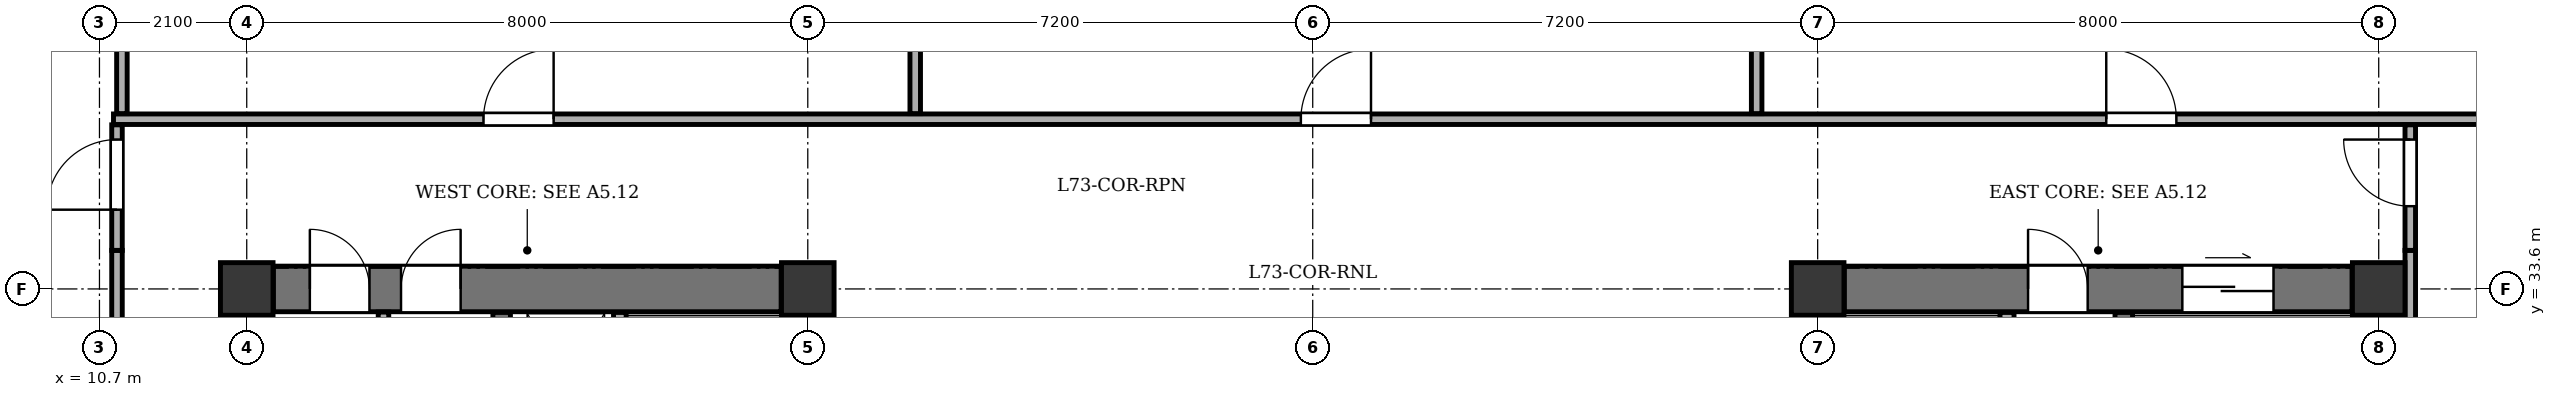
"""IFC4 building model, lengths in metres.
Left out: names, types, materials, properties, quantities, classifications, styles, units other than length and angle.
Written with IfcOpenShell. Run it as: python <this file> out.ifc"""

import sys

from ifc_helpers import new_model, si_unit, direction, frame, frame_2d, origin, origin_2d, place, context, subcontext, project, spatial, rectangle, extrude, element, fill, save


model = new_model("IFC4")
c1 = context("Model", 3, precision=1e-05, world=origin(), true_north=direction((0.0, 1.0)))
c2 = subcontext(c1, "Body", "Model", "MODEL_VIEW")
j1 = project(units=[si_unit("LENGTHUNIT", "METRE"), si_unit("PLANEANGLEUNIT", "RADIAN")], contexts=[c1])
p1 = place(None, origin())
s1 = spatial("IfcSite", under=j1, at=p1, CompositionType="ELEMENT")
p2 = place(p1, origin())
s2 = spatial("IfcBuilding", under=s1, at=p2, CompositionType="ELEMENT")
p3 = place(p2, frame((0.0, 0.0, 275.5)))
s3 = spatial("IfcBuildingStorey", under=s2, at=p3, CompositionType="ELEMENT", Elevation=275.5)
for number, where, z_axis, x_axis in (
    (1, (12.8, 33.6, 0.0), (0.0, 0.0, 1.0), (1.0, 0.0, 0.0)),
    (2, (20.8, 33.6, 0.0), (0.0, 0.0, 1.0), (1.0, 0.0, 0.0)),
    (3, (35.2, 33.6, 0.0), (0.0, 0.0, 1.0), (1.0, 0.0, 0.0)),
    (4, (43.2, 33.6, 0.0), (0.0, 0.0, 1.0), (1.0, 0.0, 0.0)),
):
    element("IfcColumn", number, at=place(p3, frame(where, z_axis=z_axis, x_axis=x_axis)), inside=s3, PredefinedType="COLUMN", context=c2, shape_type="SweptSolid", body=[
        extrude(rectangle(XDim=0.75, YDim=0.75, at=origin_2d()), origin(), (0.0, 0.0, 1.0), 3.4),
    ])
p4 = place(p3, frame((12.8, 21.18, 0.0), z_axis=(0.0, 0.0, 1.0), x_axis=(0.0, 1.0, 0.0)))
e5 = element("IfcWall", 5, at=p4, inside=s3, PredefinedType="SHEAR", context=c2, shape_type="SweptSolid", body=[
    extrude(rectangle(XDim=12.04, YDim=0.65, at=frame_2d((6.02, 0.0))), origin(), (0.0, 0.0, 1.0), 3.1),
])
p5 = place(p3, frame((13.18, 33.6, 0.0), z_axis=(0.0, 0.0, 1.0), x_axis=(1.0, 0.0, 0.0)))
e6 = element("IfcWall", 6, at=p5, inside=s3, PredefinedType="SHEAR", context=c2, shape_type="SweptSolid", body=[
    extrude(rectangle(XDim=7.24, YDim=0.65, at=frame_2d((3.62, 0.0))), origin(), (0.0, 0.0, 1.0), 3.1),
])
p6 = place(p5, frame((0.52, 0.0, 0.0)))
e7 = element("IfcOpeningElement", 7, at=p6, cuts=e6, PredefinedType="OPENING", context=c2, shape_type="SweptSolid", body=[
    extrude(rectangle(XDim=0.85, YDim=2.02, at=frame_2d((0.425, 1.01))), frame((0.0, 0.335, 0.0), z_axis=(0.0, -1.0, 0.0), x_axis=(1.0, 0.0, 0.0)), (0.0, 0.0, 1.0), 0.67),
])
p7 = place(p5, frame((1.82, 0.0, 0.0)))
e8 = element("IfcOpeningElement", 8, at=p7, cuts=e6, PredefinedType="OPENING", context=c2, shape_type="SweptSolid", body=[
    extrude(rectangle(XDim=0.85, YDim=2.02, at=frame_2d((0.425, 1.01))), frame((0.0, 0.335, 0.0), z_axis=(0.0, -1.0, 0.0), x_axis=(1.0, 0.0, 0.0)), (0.0, 0.0, 1.0), 0.67),
])
p8 = place(p3, frame((20.8, 31.1, 0.0), z_axis=(0.0, 0.0, 1.0), x_axis=(0.0, 1.0, 0.0)))
e9 = element("IfcWall", 9, at=p8, inside=s3, PredefinedType="SHEAR", context=c2, shape_type="SweptSolid", body=[
    extrude(rectangle(XDim=2.12, YDim=0.65, at=frame_2d((1.06, 0.0))), origin(), (0.0, 0.0, 1.0), 3.1),
])
p9 = place(p8, frame((0.4, 0.0, 0.0)))
e10 = element("IfcOpeningElement", 10, at=p9, cuts=e9, PredefinedType="OPENING", context=c2, shape_type="SweptSolid", body=[
    extrude(rectangle(XDim=1.1, YDim=2.1, at=frame_2d((0.55, 1.05))), frame((0.0, 0.335, 0.0), z_axis=(0.0, -1.0, 0.0), x_axis=(1.0, 0.0, 0.0)), (0.0, 0.0, 1.0), 0.67),
])
p10 = place(p3, frame((16.435, 21.135, 0.0), z_axis=(0.0, 0.0, 1.0), x_axis=(0.0, 1.0, 0.0)))
e11 = element("IfcWall", 11, at=p10, inside=s3, PredefinedType="SHEAR", context=c2, shape_type="SweptSolid", body=[
    extrude(rectangle(XDim=12.13, YDim=0.25, at=frame_2d((6.065, 0.0))), origin(), (0.0, 0.0, 1.0), 3.1),
])
p11 = place(p10, frame((0.515, 0.0, 0.0)))
e12 = element("IfcOpeningElement", 12, at=p11, cuts=e11, PredefinedType="OPENING", context=c2, shape_type="SweptSolid", body=[
    extrude(rectangle(XDim=1.2, YDim=2.15, at=frame_2d((0.6, 1.075))), frame((0.0, 0.135, 0.0), z_axis=(0.0, -1.0, 0.0), x_axis=(1.0, 0.0, 0.0)), (0.0, 0.0, 1.0), 0.27),
])
p12 = place(p10, frame((2.665, 0.0, 0.0)))
e13 = element("IfcOpeningElement", 13, at=p12, cuts=e11, PredefinedType="OPENING", context=c2, shape_type="SweptSolid", body=[
    extrude(rectangle(XDim=1.15, YDim=2.15, at=frame_2d((0.575, 1.075))), frame((0.0, 0.135, 0.0), z_axis=(0.0, -1.0, 0.0), x_axis=(1.0, 0.0, 0.0)), (0.0, 0.0, 1.0), 0.27),
])
p13 = place(p3, frame((18.12, 31.17, 0.0), z_axis=(0.0, 0.0, 1.0), x_axis=(0.0, 1.0, 0.0)))
e14 = element("IfcWall", 14, at=p13, inside=s3, PredefinedType="PARTITIONING", context=c2, shape_type="SweptSolid", body=[
    extrude(rectangle(XDim=2.095, YDim=0.18, at=frame_2d((1.047, 0.0))), origin(), (0.0, 0.0, 1.0), 3.1),
])
p14 = place(p3, frame((43.2, 21.18, 0.0), z_axis=(0.0, 0.0, 1.0), x_axis=(0.0, 1.0, 0.0)))
e15 = element("IfcWall", 15, at=p14, inside=s3, PredefinedType="SHEAR", context=c2, shape_type="SweptSolid", body=[
    extrude(rectangle(XDim=12.04, YDim=0.65, at=frame_2d((6.02, 0.0))), origin(), (0.0, 0.0, 1.0), 3.1),
])
p15 = place(p3, frame((35.58, 33.6, 0.0), z_axis=(0.0, 0.0, 1.0), x_axis=(1.0, 0.0, 0.0)))
e16 = element("IfcWall", 16, at=p15, inside=s3, PredefinedType="SHEAR", context=c2, shape_type="SweptSolid", body=[
    extrude(rectangle(XDim=7.24, YDim=0.65, at=frame_2d((3.62, 0.0))), origin(), (0.0, 0.0, 1.0), 3.1),
])
p16 = place(p15, frame((4.82, 0.0, 0.0)))
e17 = element("IfcOpeningElement", 17, at=p16, cuts=e16, PredefinedType="OPENING", context=c2, shape_type="SweptSolid", body=[
    extrude(rectangle(XDim=1.3, YDim=2.15, at=frame_2d((0.65, 1.075))), frame((0.0, 0.335, 0.0), z_axis=(0.0, -1.0, 0.0), x_axis=(1.0, 0.0, 0.0)), (0.0, 0.0, 1.0), 0.67),
])
p17 = place(p15, frame((2.62, 0.0, 0.0)))
e18 = element("IfcOpeningElement", 18, at=p17, cuts=e16, PredefinedType="OPENING", context=c2, shape_type="SweptSolid", body=[
    extrude(rectangle(XDim=0.85, YDim=2.02, at=frame_2d((0.425, 1.01))), frame((0.0, 0.335, 0.0), z_axis=(0.0, -1.0, 0.0), x_axis=(1.0, 0.0, 0.0)), (0.0, 0.0, 1.0), 0.67),
])
p18 = place(p3, frame((35.2, 31.1, 0.0), z_axis=(0.0, 0.0, 1.0), x_axis=(0.0, 1.0, 0.0)))
e19 = element("IfcWall", 19, at=p18, inside=s3, PredefinedType="SHEAR", context=c2, shape_type="SweptSolid", body=[
    extrude(rectangle(XDim=2.12, YDim=0.65, at=frame_2d((1.06, 0.0))), origin(), (0.0, 0.0, 1.0), 3.1),
])
p19 = place(p18, frame((0.4, 0.0, 0.0)))
e20 = element("IfcOpeningElement", 20, at=p19, cuts=e19, PredefinedType="OPENING", context=c2, shape_type="SweptSolid", body=[
    extrude(rectangle(XDim=1.1, YDim=2.1, at=frame_2d((0.55, 1.05))), frame((0.0, 0.335, 0.0), z_axis=(0.0, -1.0, 0.0), x_axis=(1.0, 0.0, 0.0)), (0.0, 0.0, 1.0), 0.67),
])
p20 = place(p3, frame((39.565, 21.135, 0.0), z_axis=(0.0, 0.0, 1.0), x_axis=(0.0, 1.0, 0.0)))
e21 = element("IfcWall", 21, at=p20, inside=s3, PredefinedType="SHEAR", context=c2, shape_type="SweptSolid", body=[
    extrude(rectangle(XDim=12.13, YDim=0.25, at=frame_2d((6.065, 0.0))), origin(), (0.0, 0.0, 1.0), 3.1),
])
p21 = place(p20, frame((0.515, 0.0, 0.0)))
e22 = element("IfcOpeningElement", 22, at=p21, cuts=e21, PredefinedType="OPENING", context=c2, shape_type="SweptSolid", body=[
    extrude(rectangle(XDim=1.2, YDim=2.15, at=frame_2d((0.6, 1.075))), frame((0.0, 0.135, 0.0), z_axis=(0.0, -1.0, 0.0), x_axis=(1.0, 0.0, 0.0)), (0.0, 0.0, 1.0), 0.27),
])
p22 = place(p20, frame((2.665, 0.0, 0.0)))
e23 = element("IfcOpeningElement", 23, at=p22, cuts=e21, PredefinedType="OPENING", context=c2, shape_type="SweptSolid", body=[
    extrude(rectangle(XDim=1.15, YDim=2.15, at=frame_2d((0.575, 1.075))), frame((0.0, 0.135, 0.0), z_axis=(0.0, -1.0, 0.0), x_axis=(1.0, 0.0, 0.0)), (0.0, 0.0, 1.0), 0.27),
])
p23 = place(p3, frame((37.9, 25.27, 0.0), z_axis=(0.0, 0.0, 1.0), x_axis=(0.0, 1.0, 0.0)))
e24 = element("IfcWall", 24, at=p23, inside=s3, PredefinedType="SOLIDWALL", context=c2, shape_type="SweptSolid", body=[
    extrude(rectangle(XDim=7.995, YDim=0.2, at=frame_2d((3.998, 0.0))), origin(), (0.0, 0.0, 1.0), 3.1),
])
p24 = place(p3, frame((14.75, 30.96, 0.0), z_axis=(0.0, 0.0, 1.0), x_axis=(0.0, 1.0, 0.0)))
e25 = element("IfcWall", 25, at=p24, inside=s3, PredefinedType="PARTITIONING", context=c2, shape_type="SweptSolid", body=[
    extrude(rectangle(XDim=2.31, YDim=0.15, at=frame_2d((1.155, 0.0))), origin(), (0.0, 0.0, 1.0), 3.1),
])
p25 = place(p24, frame((0.47, 0.0, 0.0)))
e26 = element("IfcOpeningElement", 26, at=p25, cuts=e25, PredefinedType="OPENING", context=c2, shape_type="SweptSolid", body=[
    extrude(rectangle(XDim=0.85, YDim=2.02, at=frame_2d((0.425, 1.01))), frame((0.0, 0.085, 0.0), z_axis=(0.0, -1.0, 0.0), x_axis=(1.0, 0.0, 0.0)), (0.0, 0.0, 1.0), 0.17),
])
p26 = place(p3, frame((10.9, 36.02, 0.0), z_axis=(0.0, 0.0, 1.0), x_axis=(1.0, 0.0, 0.0)))
e27 = element("IfcWall", 27, at=p26, inside=s3, PredefinedType="PARTITIONING", context=c2, shape_type="SweptSolid", body=[
    extrude(rectangle(XDim=34.52, YDim=0.15, at=frame_2d((17.26, 0.0))), origin(), (0.0, 0.0, 1.0), 3.1),
])
p27 = place(p26, frame((5.276, 0.0, 0.0)))
e28 = element("IfcOpeningElement", 28, at=p27, cuts=e27, PredefinedType="OPENING", context=c2, shape_type="SweptSolid", body=[
    extrude(rectangle(XDim=1.0, YDim=2.1, at=frame_2d((0.5, 1.05))), frame((0.0, 0.085, 0.0), z_axis=(0.0, -1.0, 0.0), x_axis=(1.0, 0.0, 0.0)), (0.0, 0.0, 1.0), 0.17),
])
p28 = place(p26, frame((16.931, 0.0, 0.0)))
e29 = element("IfcOpeningElement", 29, at=p28, cuts=e27, PredefinedType="OPENING", context=c2, shape_type="SweptSolid", body=[
    extrude(rectangle(XDim=1.0, YDim=2.1, at=frame_2d((0.5, 1.05))), frame((0.0, 0.085, 0.0), z_axis=(0.0, -1.0, 0.0), x_axis=(1.0, 0.0, 0.0)), (0.0, 0.0, 1.0), 0.17),
])
p29 = place(p26, frame((28.415, 0.0, 0.0)))
e30 = element("IfcOpeningElement", 30, at=p29, cuts=e27, PredefinedType="OPENING", context=c2, shape_type="SweptSolid", body=[
    extrude(rectangle(XDim=1.0, YDim=2.1, at=frame_2d((0.5, 1.05))), frame((0.0, 0.085, 0.0), z_axis=(0.0, -1.0, 0.0), x_axis=(1.0, 0.0, 0.0)), (0.0, 0.0, 1.0), 0.17),
])
p30 = place(p3, frame((11.02, 36.1, 0.0), z_axis=(0.0, 0.0, 1.0), x_axis=(0.0, 1.0, 0.0)))
e31 = element("IfcWall", 31, at=p30, inside=s3, PredefinedType="PARTITIONING", context=c2, shape_type="SweptSolid", body=[
    extrude(rectangle(XDim=8.655, YDim=0.15, at=frame_2d((4.327, 0.0))), origin(), (0.0, 0.0, 1.0), 3.1),
])
p31 = place(p3, frame((22.332, 36.1, 0.0), z_axis=(0.0, 0.0, 1.0), x_axis=(0.0, 1.0, 0.0)))
e32 = element("IfcWall", 32, at=p31, inside=s3, PredefinedType="PARTITIONING", context=c2, shape_type="SweptSolid", body=[
    extrude(rectangle(XDim=8.655, YDim=0.15, at=frame_2d((4.327, 0.0))), origin(), (0.0, 0.0, 1.0), 2.725),
])
p32 = place(p3, frame((34.33, 36.1, 0.0), z_axis=(0.0, 0.0, 1.0), x_axis=(0.0, 1.0, 0.0)))
e33 = element("IfcWall", 33, at=p32, inside=s3, PredefinedType="PARTITIONING", context=c2, shape_type="SweptSolid", body=[
    extrude(rectangle(XDim=8.655, YDim=0.15, at=frame_2d((4.327, 0.0))), origin(), (0.0, 0.0, 1.0), 3.1),
])
p33 = place(p3, frame((10.95, 20.25, 0.0), z_axis=(0.0, 0.0, 1.0), x_axis=(0.0, 1.0, 0.0)))
e34 = element("IfcWall", 34, at=p33, inside=s3, PredefinedType="PARTITIONING", context=c2, shape_type="SweptSolid", body=[
    extrude(rectangle(XDim=13.9, YDim=0.15, at=frame_2d((6.95, 0.0))), origin(), (0.0, 0.0, 1.0), 3.1),
])
p34 = place(p3, frame((10.95, 34.15, 0.0), z_axis=(0.0, 0.0, 1.0), x_axis=(0.0, 1.0, 0.0)))
e35 = element("IfcWall", 35, at=p34, inside=s3, PredefinedType="PARTITIONING", context=c2, shape_type="SweptSolid", body=[
    extrude(rectangle(XDim=1.79, YDim=0.15, at=frame_2d((0.895, 0.0))), origin(), (0.0, 0.0, 1.0), 3.1),
])
p35 = place(p34, frame((0.58, 0.0, 0.0)))
e36 = element("IfcOpeningElement", 36, at=p35, cuts=e35, PredefinedType="OPENING", context=c2, shape_type="SweptSolid", body=[
    extrude(rectangle(XDim=1.0, YDim=2.1, at=frame_2d((0.5, 1.05))), frame((0.0, 0.085, 0.0), z_axis=(0.0, -1.0, 0.0), x_axis=(1.0, 0.0, 0.0)), (0.0, 0.0, 1.0), 0.17),
])
p36 = place(p3, frame((43.65, 20.88, 0.0), z_axis=(0.0, 0.0, 1.0), x_axis=(0.0, 1.0, 0.0)))
e37 = element("IfcWall", 37, at=p36, inside=s3, PredefinedType="PARTITIONING", context=c2, shape_type="SweptSolid", body=[
    extrude(rectangle(XDim=13.27, YDim=0.15, at=frame_2d((6.635, 0.0))), origin(), (0.0, 0.0, 1.0), 3.1),
])
p37 = place(p3, frame((43.65, 34.15, 0.0), z_axis=(0.0, 0.0, 1.0), x_axis=(0.0, 1.0, 0.0)))
e38 = element("IfcWall", 38, at=p37, inside=s3, PredefinedType="PARTITIONING", context=c2, shape_type="SweptSolid", body=[
    extrude(rectangle(XDim=1.79, YDim=0.15, at=frame_2d((0.895, 0.0))), origin(), (0.0, 0.0, 1.0), 3.1),
])
p38 = place(p37, frame((0.63, 0.0, 0.0)))
e39 = element("IfcOpeningElement", 39, at=p38, cuts=e38, PredefinedType="OPENING", context=c2, shape_type="SweptSolid", body=[
    extrude(rectangle(XDim=0.95, YDim=2.1, at=frame_2d((0.475, 1.05))), frame((0.0, 0.085, 0.0), z_axis=(0.0, -1.0, 0.0), x_axis=(1.0, 0.0, 0.0)), (0.0, 0.0, 1.0), 0.17),
])
p39 = place(p6, origin())
e40 = element("IfcDoor", 40, at=p39, inside=s3, OperationType="SINGLE_SWING_LEFT", PredefinedType="DOOR", context=c2, shape_type="SweptSolid", body=[
    extrude(rectangle(XDim=0.85, YDim=2.02, at=frame_2d((0.425, 1.01))), frame((0.0, 0.025, 0.0), z_axis=(0.0, -1.0, 0.0), x_axis=(1.0, 0.0, 0.0)), (0.0, 0.0, 1.0), 0.05),
])
fill(e7, e40)
p40 = place(p7, origin())
e41 = element("IfcDoor", 41, at=p40, inside=s3, OperationType="SINGLE_SWING_RIGHT", PredefinedType="DOOR", context=c2, shape_type="SweptSolid", body=[
    extrude(rectangle(XDim=0.85, YDim=2.02, at=frame_2d((0.425, 1.01))), frame((0.0, 0.025, 0.0), z_axis=(0.0, -1.0, 0.0), x_axis=(1.0, 0.0, 0.0)), (0.0, 0.0, 1.0), 0.05),
])
fill(e8, e41)
p41 = place(p16, origin())
e42 = element("IfcDoor", 42, at=p41, inside=s3, OperationType="DOUBLE_DOOR_SLIDING", PredefinedType="DOOR", context=c2, shape_type="SweptSolid", body=[
    extrude(rectangle(XDim=1.3, YDim=2.15, at=frame_2d((0.65, 1.075))), frame((0.0, 0.025, 0.0), z_axis=(0.0, -1.0, 0.0), x_axis=(1.0, 0.0, 0.0)), (0.0, 0.0, 1.0), 0.05),
])
fill(e17, e42)
p42 = place(p17, origin())
e43 = element("IfcDoor", 43, at=p42, inside=s3, OperationType="SINGLE_SWING_LEFT", PredefinedType="DOOR", context=c2, shape_type="SweptSolid", body=[
    extrude(rectangle(XDim=0.85, YDim=2.02, at=frame_2d((0.425, 1.01))), frame((0.0, 0.025, 0.0), z_axis=(0.0, -1.0, 0.0), x_axis=(1.0, 0.0, 0.0)), (0.0, 0.0, 1.0), 0.05),
])
fill(e18, e43)
p43 = place(p27, origin())
e44 = element("IfcDoor", 44, at=p43, inside=s3, OperationType="SINGLE_SWING_RIGHT", PredefinedType="DOOR", context=c2, shape_type="SweptSolid", body=[
    extrude(rectangle(XDim=1.0, YDim=2.1, at=frame_2d((0.5, 1.05))), frame((0.0, 0.025, 0.0), z_axis=(0.0, -1.0, 0.0), x_axis=(1.0, 0.0, 0.0)), (0.0, 0.0, 1.0), 0.05),
])
fill(e28, e44)
p44 = place(p28, origin())
e45 = element("IfcDoor", 45, at=p44, inside=s3, OperationType="SINGLE_SWING_RIGHT", PredefinedType="DOOR", context=c2, shape_type="SweptSolid", body=[
    extrude(rectangle(XDim=1.0, YDim=2.1, at=frame_2d((0.5, 1.05))), frame((0.0, 0.025, 0.0), z_axis=(0.0, -1.0, 0.0), x_axis=(1.0, 0.0, 0.0)), (0.0, 0.0, 1.0), 0.05),
])
fill(e29, e45)
p45 = place(p29, origin())
e46 = element("IfcDoor", 46, at=p45, inside=s3, OperationType="SINGLE_SWING_LEFT", PredefinedType="DOOR", context=c2, shape_type="SweptSolid", body=[
    extrude(rectangle(XDim=1.0, YDim=2.1, at=frame_2d((0.5, 1.05))), frame((0.0, 0.025, 0.0), z_axis=(0.0, -1.0, 0.0), x_axis=(1.0, 0.0, 0.0)), (0.0, 0.0, 1.0), 0.05),
])
fill(e30, e46)
p46 = place(p35, origin())
e47 = element("IfcDoor", 47, at=p46, inside=s3, OperationType="SINGLE_SWING_LEFT", PredefinedType="DOOR", context=c2, shape_type="SweptSolid", body=[
    extrude(rectangle(XDim=1.0, YDim=2.1, at=frame_2d((0.5, 1.05))), frame((0.0, 0.025, 0.0), z_axis=(0.0, -1.0, 0.0), x_axis=(1.0, 0.0, 0.0)), (0.0, 0.0, 1.0), 0.05),
])
fill(e36, e47)
p47 = place(p38, origin())
e48 = element("IfcDoor", 48, at=p47, inside=s3, OperationType="SINGLE_SWING_RIGHT", PredefinedType="DOOR", context=c2, shape_type="SweptSolid", body=[
    extrude(rectangle(XDim=0.95, YDim=2.1, at=frame_2d((0.475, 1.05))), frame((0.0, 0.025, 0.0), z_axis=(0.0, -1.0, 0.0), x_axis=(1.0, 0.0, 0.0)), (0.0, 0.0, 1.0), 0.05),
])
fill(e39, e48)
save(model, sys.argv[1])
